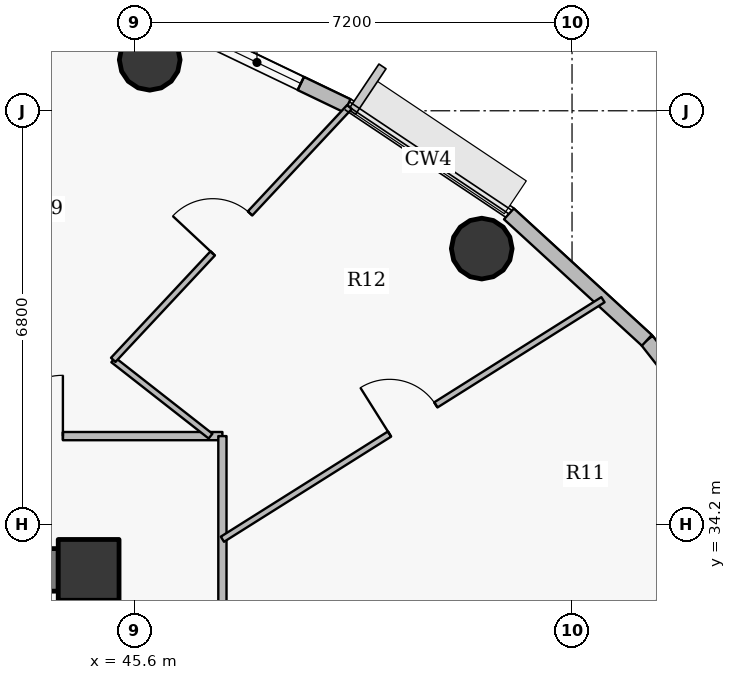
"""IFC4 building model, lengths in metres.
Left out: names, types, materials, properties, quantities, classifications, styles, units other than length and angle.
Written with IfcOpenShell. Run it as: python <this file> out.ifc"""

import sys

from ifc_helpers import new_model, si_unit, direction, frame, frame_2d, origin, origin_2d, place, context, subcontext, project, spatial, rectangle, hollow_circle, extrude, source, transform, mapped, element, fill, save


model = new_model("IFC4")
c1 = context("Model", 3, precision=1e-05, world=origin(), true_north=direction((0.0, 1.0)))
c2 = subcontext(c1, "Body", "Model", "MODEL_VIEW")
j1 = project(units=[si_unit("LENGTHUNIT", "METRE"), si_unit("PLANEANGLEUNIT", "RADIAN")], contexts=[c1])
p1 = place(None, origin())
s1 = spatial("IfcSite", under=j1, at=p1, CompositionType="ELEMENT")
p2 = place(p1, origin())
s2 = spatial("IfcBuilding", under=s1, at=p2, CompositionType="ELEMENT")
p3 = place(p2, frame((0.0, 0.0, 303.0)))
s3 = spatial("IfcBuildingStorey", under=s2, at=p3, CompositionType="ELEMENT", Elevation=303.0)
p4 = place(p3, frame((44.85, 33.45, 0.0), z_axis=(0.0, 0.0, 1.0), x_axis=(1.0, 0.0, 0.0)))
e1 = element("IfcColumn", 1, at=p4, inside=s3, PredefinedType="COLUMN", context=c2, shape_type="SweptSolid", body=[
    extrude(rectangle(XDim=1.0, YDim=1.0, at=origin_2d()), origin(), (0.0, 0.0, 1.0), 3.75),
])
p5 = place(p3, frame((27.65, 33.45, 0.0), z_axis=(0.0, 0.0, 1.0), x_axis=(1.0, 0.0, 0.0)))
e2 = element("IfcWall", 2, at=p5, inside=s3, PredefinedType="SHEAR", context=c2, shape_type="SweptSolid", body=[
    extrude(rectangle(XDim=16.7, YDim=0.7, at=frame_2d((8.35, 0.0))), origin(), (0.0, 0.0, 1.0), 3.05),
])
p6 = place(p5, frame((12.775, 0.0, 0.0)))
e3 = element("IfcOpeningElement", 3, at=p6, cuts=e2, PredefinedType="OPENING", context=c2, shape_type="SweptSolid", body=[
    extrude(rectangle(XDim=1.15, YDim=2.15, at=origin_2d()), frame((0.575, 0.36, 1.075), z_axis=(0.0, -1.0, 0.0), x_axis=(1.0, 0.0, 0.0)), (0.0, 0.0, 1.0), 0.72),
])
for number, where, z_axis, x_axis in (
    (4, (51.315, 38.733, 0.0), (0.0, 0.0, 1.0), (1.0, 0.0, 0.0)),
    (5, (45.854, 41.839, 0.0), (0.0, 0.0, 1.0), (1.0, 0.0, 0.0)),
):
    element("IfcColumn", number, at=place(p3, frame(where, z_axis=z_axis, x_axis=x_axis)), inside=s3, PredefinedType="COLUMN", context=c2, shape_type="SweptSolid", body=[
        extrude(hollow_circle(Radius=0.5, WallThickness=0.032, at=origin_2d()), origin(), (0.0, 0.0, 1.0), 3.75),
    ])
p7 = place(p3, frame((54.03, 37.225, 0.0), z_axis=(0.0, 0.0, 1.0), x_axis=(0.616337186556, -0.787482363275, 0.0)))
e6 = element("IfcWall", 6, at=p7, inside=s3, PredefinedType="SOLIDWALL", context=c2, shape_type="SweptSolid", body=[
    extrude(rectangle(XDim=2.958, YDim=0.24, at=frame_2d((1.479, 0.0))), origin(), (0.0, 0.0, 1.0), 3.5),
])
p8 = place(p7, frame((0.854, 0.0, 0.9)))
e7 = element("IfcOpeningElement", 7, at=p8, cuts=e6, PredefinedType="OPENING", context=c2, shape_type="SweptSolid", body=[
    extrude(rectangle(XDim=1.25, YDim=1.65, at=origin_2d()), frame((0.625, 0.13, 0.825), z_axis=(0.0, -1.0, 0.0), x_axis=(1.0, 0.0, 0.0)), (0.0, 0.0, 1.0), 0.26),
])
p9 = place(p3, frame((51.762, 39.304, 0.0), z_axis=(0.0, 0.0, 1.0), x_axis=(0.737068506972, -0.675818034703, 0.0)))
e8 = element("IfcWall", 8, at=p9, inside=s3, PredefinedType="SOLIDWALL", context=c2, shape_type="SweptSolid", body=[
    extrude(rectangle(XDim=3.077, YDim=0.24, at=frame_2d((1.539, 0.0))), origin(), (0.0, 0.0, 1.0), 3.5),
])
p10 = place(p3, frame((46.123, 42.512, 0.0), z_axis=(0.0, 0.0, 1.0), x_axis=(0.901573741254, -0.43262546051, 0.0)))
e9 = element("IfcWall", 9, at=p10, inside=s3, PredefinedType="SOLIDWALL", context=c2, shape_type="SweptSolid", body=[
    extrude(rectangle(XDim=3.307, YDim=0.24, at=frame_2d((1.653, 0.0))), origin(), (0.0, 0.0, 1.0), 3.5),
])
p11 = place(p10, frame((0.858, 0.0, 0.9)))
e10 = element("IfcOpeningElement", 10, at=p11, cuts=e9, PredefinedType="OPENING", context=c2, shape_type="SweptSolid", body=[
    extrude(rectangle(XDim=1.6, YDim=1.75, at=origin_2d()), frame((0.8, 0.13, 0.875), z_axis=(0.0, -1.0, 0.0), x_axis=(1.0, 0.0, 0.0)), (0.0, 0.0, 1.0), 0.26),
])
p12 = place(p3, frame((36.95, 35.65, 0.0), z_axis=(0.0, 0.0, 1.0), x_axis=(1.0, 0.0, 0.0)))
e11 = element("IfcWall", 11, at=p12, inside=s3, PredefinedType="PARTITIONING", context=c2, shape_type="SweptSolid", body=[
    extrude(rectangle(XDim=10.1, YDim=0.135, at=frame_2d((5.05, 0.0))), origin(), (0.0, 0.0, 1.0), 3.035),
])
p13 = place(p12, frame((6.477, 0.0, 0.0)))
e12 = element("IfcOpeningElement", 12, at=p13, cuts=e11, PredefinedType="OPENING", context=c2, shape_type="SweptSolid", body=[
    extrude(rectangle(XDim=1.0, YDim=2.15, at=origin_2d()), frame((0.5, 0.078, 1.075), z_axis=(0.0, -1.0, 0.0), x_axis=(1.0, 0.0, 0.0)), (0.0, 0.0, 1.0), 0.155),
])
p14 = place(p3, frame((45.254, 36.904, 0.0), z_axis=(0.0, 0.0, 1.0), x_axis=(0.787350433025, -0.616505714179, 0.0)))
e13 = element("IfcWall", 13, at=p14, inside=s3, PredefinedType="PARTITIONING", context=c2, shape_type="SweptSolid", body=[
    extrude(rectangle(XDim=2.033, YDim=0.1, at=frame_2d((1.017, 0.0))), origin(), (0.0, 0.0, 1.0), 3.5),
])
p15 = place(p3, frame((45.254, 36.904, 0.0), z_axis=(0.0, 0.0, 1.0), x_axis=(0.682727638106, 0.73067295842, 0.0)))
e14 = element("IfcWall", 14, at=p15, inside=s3, PredefinedType="PARTITIONING", context=c2, shape_type="SweptSolid", body=[
    extrude(rectangle(XDim=5.693, YDim=0.1, at=frame_2d((2.846, 0.0))), origin(), (0.0, 0.0, 1.0), 2.985),
])
p16 = place(p15, frame((2.396, 0.0, 0.0)))
e15 = element("IfcOpeningElement", 15, at=p16, cuts=e14, PredefinedType="OPENING", context=c2, shape_type="SweptSolid", body=[
    extrude(rectangle(XDim=0.9, YDim=2.1, at=origin_2d()), frame((0.45, 0.06, 1.05), z_axis=(0.0, -1.0, 0.0), x_axis=(1.0, 0.0, 0.0)), (0.0, 0.0, 1.0), 0.12),
])
p17 = place(p3, frame((47.05, 18.35, 0.0), z_axis=(0.0, 0.0, 1.0), x_axis=(0.0, 1.0, 0.0)))
e16 = element("IfcWall", 16, at=p17, inside=s3, PredefinedType="PARTITIONING", context=c2, shape_type="SweptSolid", body=[
    extrude(rectangle(XDim=17.3, YDim=0.135, at=frame_2d((8.65, 0.0))), origin(), (0.0, 0.0, 1.0), 3.035),
])
p18 = place(p17, frame((6.155, 0.0, 0.0)))
e17 = element("IfcOpeningElement", 17, at=p18, cuts=e16, PredefinedType="OPENING", context=c2, shape_type="SweptSolid", body=[
    extrude(rectangle(XDim=1.0, YDim=2.15, at=origin_2d()), frame((0.5, 0.078, 1.075), z_axis=(0.0, -1.0, 0.0), x_axis=(1.0, 0.0, 0.0)), (0.0, 0.0, 1.0), 0.155),
])
p19 = place(p3, frame((47.05, 30.565, 0.0), z_axis=(0.0, 0.0, 1.0), x_axis=(0.951682976888, 0.307082255269, 0.0)))
e18 = element("IfcWall", 18, at=p19, inside=s3, PredefinedType="PARTITIONING", context=c2, shape_type="SweptSolid", body=[
    extrude(rectangle(XDim=9.963, YDim=0.135, at=frame_2d((4.981, 0.0))), origin(), (0.0, 0.0, 1.0), 2.985),
])
p20 = place(p3, frame((47.05, 33.954, 0.0), z_axis=(0.0, 0.0, 1.0), x_axis=(0.846339777122, 0.532643390704, 0.0)))
e19 = element("IfcWall", 19, at=p20, inside=s3, PredefinedType="PARTITIONING", context=c2, shape_type="SweptSolid", body=[
    extrude(rectangle(XDim=7.395, YDim=0.1, at=frame_2d((3.698, 0.0))), origin(), (0.0, 0.0, 1.0), 2.985),
])
p21 = place(p20, frame((3.248, 0.0, 0.0)))
e20 = element("IfcOpeningElement", 20, at=p21, cuts=e19, PredefinedType="OPENING", context=c2, shape_type="SweptSolid", body=[
    extrude(rectangle(XDim=0.9, YDim=2.1, at=origin_2d()), frame((0.45, 0.06, 1.05), z_axis=(0.0, -1.0, 0.0), x_axis=(1.0, 0.0, 0.0)), (0.0, 0.0, 1.0), 0.12),
])
p22 = place(p3, frame((45.2, 33.8, 0.0), z_axis=(0.0, 0.0, 1.0), x_axis=(-1.0, 0.0, 0.0)))
e21 = element("IfcWall", 21, at=p22, inside=s3, PredefinedType="PARTITIONING", context=c2, shape_type="SweptSolid", body=[
    extrude(rectangle(XDim=0.84, YDim=0.135, at=frame_2d((0.42, 0.0))), origin(), (0.0, 0.0, 1.0), 3.035),
])
p23 = place(p3, frame((45.2, 32.96, 0.0), z_axis=(0.0, 0.0, 1.0), x_axis=(0.0, 1.0, 0.0)))
e22 = element("IfcWall", 22, at=p23, inside=s3, PredefinedType="PARTITIONING", context=c2, shape_type="SweptSolid", body=[
    extrude(rectangle(XDim=0.532, YDim=0.135, at=frame_2d((0.266, 0.0))), origin(), (0.0, 0.0, 1.0), 3.5),
])
m1 = source(origin(), c2, "Body", "SweptSolid", [
    extrude(rectangle(XDim=1.6, YDim=1.75, at=origin_2d()), frame((0.8, 0.03, 0.875), z_axis=(0.0, -1.0, 0.0), x_axis=(1.0, 0.0, 0.0)), (0.0, 0.0, 1.0), 0.06),
])
p24 = place(p11, origin())
e23 = element("IfcWindow", 23, at=p24, inside=s3, PartitioningType="DOUBLE_PANEL_VERTICAL", PredefinedType="WINDOW", context=c2, shape_type="MappedRepresentation", body=[
    mapped(m1, transform((0.0, 0.0, 0.0), x_axis=(1.0, 0.0, 0.0), y_axis=(0.0, 1.0, 0.0), z_axis=(0.0, 0.0, 1.0), scale=1.0)),
])
fill(e10, e23)
m2 = source(origin(), c2, "Body", "SweptSolid", [
    extrude(rectangle(XDim=1.0, YDim=2.15, at=origin_2d()), frame((0.5, 0.025, 1.075), z_axis=(0.0, -1.0, 0.0), x_axis=(1.0, 0.0, 0.0)), (0.0, 0.0, 1.0), 0.05),
])
p25 = place(p13, origin())
e24 = element("IfcDoor", 24, at=p25, inside=s3, OperationType="SINGLE_SWING_RIGHT", PredefinedType="DOOR", context=c2, shape_type="MappedRepresentation", body=[
    mapped(m2, transform((0.0, 0.0, 0.0), x_axis=(1.0, 0.0, 0.0), y_axis=(0.0, 1.0, 0.0), z_axis=(0.0, 0.0, 1.0), scale=1.0)),
])
fill(e12, e24)
m3 = source(origin(), c2, "Body", "SweptSolid", [
    extrude(rectangle(XDim=0.9, YDim=2.1, at=origin_2d()), frame((0.45, 0.025, 1.05), z_axis=(0.0, -1.0, 0.0), x_axis=(1.0, 0.0, 0.0)), (0.0, 0.0, 1.0), 0.05),
])
p26 = place(p16, origin())
e25 = element("IfcDoor", 25, at=p26, inside=s3, OperationType="SINGLE_SWING_LEFT", PredefinedType="DOOR", context=c2, shape_type="MappedRepresentation", body=[
    mapped(m3, transform((0.0, 0.0, 0.0), x_axis=(1.0, 0.0, 0.0), y_axis=(0.0, 1.0, 0.0), z_axis=(0.0, 0.0, 1.0), scale=1.0)),
])
fill(e15, e25)
p27 = place(p21, origin())
e26 = element("IfcDoor", 26, at=p27, inside=s3, OperationType="SINGLE_SWING_LEFT", PredefinedType="DOOR", context=c2, shape_type="MappedRepresentation", body=[
    mapped(m3, transform((0.0, 0.0, 0.0), x_axis=(1.0, 0.0, 0.0), y_axis=(0.0, 1.0, 0.0), z_axis=(0.0, 0.0, 1.0), scale=1.0)),
])
fill(e20, e26)
save(model, sys.argv[1])
